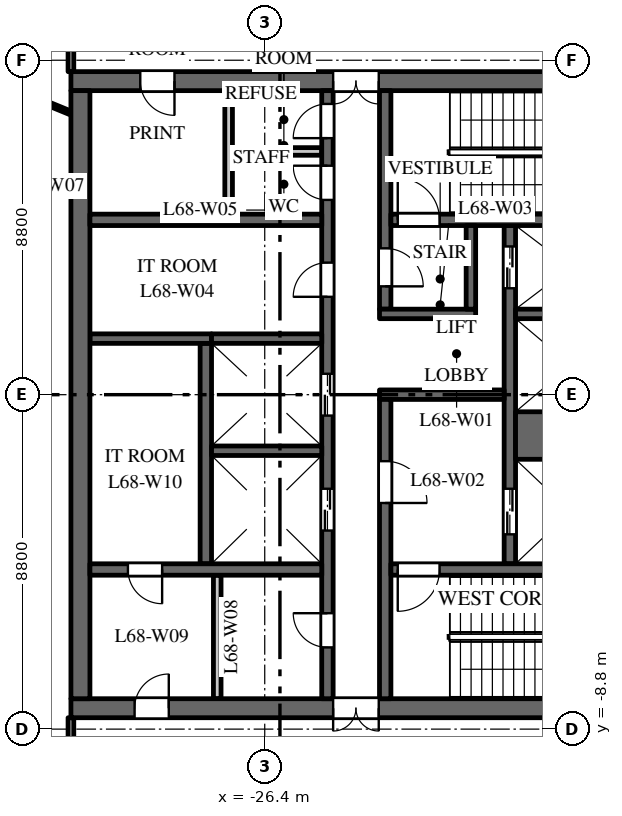
"""IFC4 building model, lengths in metres.
Left out: names, types, materials, properties, quantities, classifications, styles, units other than length and angle.
Written with IfcOpenShell. Run it as: python <this file> out.ifc"""

import sys

from ifc_helpers import new_model, si_unit, direction, frame, frame_2d, origin, place, context, subcontext, project, spatial, rectangle, extrude, element, fill, save


model = new_model("IFC4")
c1 = context("Model", 3, precision=1e-05, world=origin(), true_north=direction((0.0, 1.0)))
c2 = subcontext(c1, "Body", "Model", "MODEL_VIEW")
j1 = project(units=[si_unit("LENGTHUNIT", "METRE"), si_unit("PLANEANGLEUNIT", "RADIAN")], contexts=[c1])
p1 = place(None, origin())
s1 = spatial("IfcSite", under=j1, at=p1, CompositionType="ELEMENT")
p2 = place(p1, origin())
s2 = spatial("IfcBuilding", under=s1, at=p2, CompositionType="ELEMENT")
p3 = place(p2, frame((0.0, 0.0, 315.0)))
s3 = spatial("IfcBuildingStorey", under=s2, at=p3, CompositionType="ELEMENT", Elevation=315.0)
p4 = place(p3, frame((-16.5, 8.25, 0.0), z_axis=(0.0, 0.0, 1.0), x_axis=(-1.0, 0.0, 0.0)))
e1 = element("IfcWall", 1, at=p4, inside=s3, PredefinedType="SHEAR", context=c2, shape_type="SweptSolid", body=[
    extrude(rectangle(XDim=15.0, YDim=0.5, at=frame_2d((7.5, 0.0))), origin(), (0.0, 0.0, 1.0), 3.7),
])
p5 = place(p4, frame((6.9, 0.0, 0.0)))
e2 = element("IfcOpeningElement", 2, at=p5, cuts=e1, PredefinedType="OPENING", context=c2, shape_type="SweptSolid", body=[
    extrude(rectangle(XDim=1.2, YDim=2.1, at=frame_2d((0.6, 1.05))), frame((0.0, 0.26, 0.0), z_axis=(0.0, -1.0, 0.0), x_axis=(1.0, 0.0, 0.0)), (0.0, 0.0, 1.0), 0.52),
])
p6 = place(p4, frame((12.275, 0.0, 0.0)))
e3 = element("IfcOpeningElement", 3, at=p6, cuts=e1, PredefinedType="OPENING", context=c2, shape_type="SweptSolid", body=[
    extrude(rectangle(XDim=0.9, YDim=2.1, at=frame_2d((0.45, 1.05))), frame((0.0, 0.26, 0.0), z_axis=(0.0, -1.0, 0.0), x_axis=(1.0, 0.0, 0.0)), (0.0, 0.0, 1.0), 0.52),
])
p7 = place(p3, frame((-16.5, -8.25, 0.0), z_axis=(0.0, 0.0, 1.0), x_axis=(-1.0, 0.0, 0.0)))
e4 = element("IfcWall", 4, at=p7, inside=s3, PredefinedType="SHEAR", context=c2, shape_type="SweptSolid", body=[
    extrude(rectangle(XDim=15.0, YDim=0.5, at=frame_2d((7.5, 0.0))), origin(), (0.0, 0.0, 1.0), 3.7),
])
p8 = place(p7, frame((6.9, 0.0, 0.0)))
e5 = element("IfcOpeningElement", 5, at=p8, cuts=e4, PredefinedType="OPENING", context=c2, shape_type="SweptSolid", body=[
    extrude(rectangle(XDim=1.2, YDim=2.1, at=frame_2d((0.6, 1.05))), frame((0.0, 0.26, 0.0), z_axis=(0.0, -1.0, 0.0), x_axis=(1.0, 0.0, 0.0)), (0.0, 0.0, 1.0), 0.52),
])
p9 = place(p7, frame((12.425, 0.0, 0.0)))
e6 = element("IfcOpeningElement", 6, at=p9, cuts=e4, PredefinedType="OPENING", context=c2, shape_type="SweptSolid", body=[
    extrude(rectangle(XDim=0.9, YDim=2.1, at=frame_2d((0.45, 1.05))), frame((0.0, 0.26, 0.0), z_axis=(0.0, -1.0, 0.0), x_axis=(1.0, 0.0, 0.0)), (0.0, 0.0, 1.0), 0.52),
])
p10 = place(p3, frame((-27.95, -4.45, 0.0), z_axis=(0.0, 0.0, 1.0), x_axis=(0.0, 1.0, 0.0)))
e7 = element("IfcWall", 7, at=p10, inside=s3, PredefinedType="SHEAR", context=c2, shape_type="SweptSolid", body=[
    extrude(rectangle(XDim=5.8, YDim=0.3, at=frame_2d((2.9, 0.0))), origin(), (0.0, 0.0, 1.0), 3.7),
])
p11 = place(p3, frame((-27.8, 1.475, 0.0), z_axis=(0.0, 0.0, 1.0), x_axis=(-1.0, 0.0, 0.0)))
e8 = element("IfcWall", 8, at=p11, inside=s3, PredefinedType="SHEAR", context=c2, shape_type="SweptSolid", body=[
    extrude(rectangle(XDim=3.2, YDim=0.25, at=frame_2d((1.6, 0.0))), origin(), (0.0, 0.0, 1.0), 3.7),
])
p12 = place(p3, frame((-19.95, -4.45, 0.0), z_axis=(0.0, 0.0, 1.0), x_axis=(0.0, 1.0, 0.0)))
e9 = element("IfcWall", 9, at=p12, inside=s3, PredefinedType="SHEAR", context=c2, shape_type="SweptSolid", body=[
    extrude(rectangle(XDim=8.9, YDim=0.3, at=frame_2d((4.45, 0.0))), origin(), (0.0, 0.0, 1.0), 3.7),
])
p13 = place(p12, frame((0.775, 0.0, 0.0)))
e10 = element("IfcOpeningElement", 10, at=p13, cuts=e9, PredefinedType="OPENING", context=c2, shape_type="SweptSolid", body=[
    extrude(rectangle(XDim=1.2, YDim=2.1, at=frame_2d((0.6, 1.05))), frame((0.0, 0.16, 0.0), z_axis=(0.0, -1.0, 0.0), x_axis=(1.0, 0.0, 0.0)), (0.0, 0.0, 1.0), 0.32),
])
p14 = place(p12, frame((7.25, 0.0, 0.0)))
e11 = element("IfcOpeningElement", 11, at=p14, cuts=e9, PredefinedType="OPENING", context=c2, shape_type="SweptSolid", body=[
    extrude(rectangle(XDim=1.1, YDim=2.1, at=frame_2d((0.55, 1.05))), frame((0.0, 0.16, 0.0), z_axis=(0.0, -1.0, 0.0), x_axis=(1.0, 0.0, 0.0)), (0.0, 0.0, 1.0), 0.32),
])
p15 = place(p3, frame((-24.75, -8.0, 0.0), z_axis=(0.0, 0.0, 1.0), x_axis=(0.0, 1.0, 0.0)))
e12 = element("IfcWall", 12, at=p15, inside=s3, PredefinedType="SHEAR", context=c2, shape_type="SweptSolid", body=[
    extrude(rectangle(XDim=16.0, YDim=0.3, at=frame_2d((8.0, 0.0))), origin(), (0.0, 0.0, 1.0), 3.7),
])
p16 = place(p15, frame((4.425, 0.0, 0.0)))
e13 = element("IfcOpeningElement", 13, at=p16, cuts=e12, PredefinedType="OPENING", context=c2, shape_type="SweptSolid", body=[
    extrude(rectangle(XDim=1.1, YDim=2.1, at=frame_2d((0.55, 1.05))), frame((0.0, 0.16, 0.0), z_axis=(0.0, -1.0, 0.0), x_axis=(1.0, 0.0, 0.0)), (0.0, 0.0, 1.0), 0.32),
])
p17 = place(p15, frame((7.45, 0.0, 0.0)))
e14 = element("IfcOpeningElement", 14, at=p17, cuts=e12, PredefinedType="OPENING", context=c2, shape_type="SweptSolid", body=[
    extrude(rectangle(XDim=1.1, YDim=2.1, at=frame_2d((0.55, 1.05))), frame((0.0, 0.16, 0.0), z_axis=(0.0, -1.0, 0.0), x_axis=(1.0, 0.0, 0.0)), (0.0, 0.0, 1.0), 0.32),
])
p18 = place(p15, frame((10.575, 0.0, 0.0)))
e15 = element("IfcOpeningElement", 15, at=p18, cuts=e12, PredefinedType="OPENING", context=c2, shape_type="SweptSolid", body=[
    extrude(rectangle(XDim=0.9, YDim=2.1, at=frame_2d((0.45, 1.05))), frame((0.0, 0.16, 0.0), z_axis=(0.0, -1.0, 0.0), x_axis=(1.0, 0.0, 0.0)), (0.0, 0.0, 1.0), 0.32),
])
p19 = place(p15, frame((13.125, 0.0, 0.0)))
e16 = element("IfcOpeningElement", 16, at=p19, cuts=e12, PredefinedType="OPENING", context=c2, shape_type="SweptSolid", body=[
    extrude(rectangle(XDim=0.9, YDim=2.1, at=frame_2d((0.45, 1.05))), frame((0.0, 0.16, 0.0), z_axis=(0.0, -1.0, 0.0), x_axis=(1.0, 0.0, 0.0)), (0.0, 0.0, 1.0), 0.32),
])
p20 = place(p15, frame((14.75, 0.0, 0.0)))
e17 = element("IfcOpeningElement", 17, at=p20, cuts=e12, PredefinedType="OPENING", context=c2, shape_type="SweptSolid", body=[
    extrude(rectangle(XDim=0.9, YDim=2.1, at=frame_2d((0.45, 1.05))), frame((0.0, 0.16, 0.0), z_axis=(0.0, -1.0, 0.0), x_axis=(1.0, 0.0, 0.0)), (0.0, 0.0, 1.0), 0.32),
])
p21 = place(p15, frame((1.35, 0.0, 0.0)))
e18 = element("IfcOpeningElement", 18, at=p21, cuts=e12, PredefinedType="OPENING", context=c2, shape_type="SweptSolid", body=[
    extrude(rectangle(XDim=0.9, YDim=2.1, at=frame_2d((0.45, 1.05))), frame((0.0, 0.16, 0.0), z_axis=(0.0, -1.0, 0.0), x_axis=(1.0, 0.0, 0.0)), (0.0, 0.0, 1.0), 0.32),
])
p22 = place(p3, frame((-20.1, 0.0, 0.0), z_axis=(0.0, 0.0, 1.0), x_axis=(-1.0, 0.0, 0.0)))
e19 = element("IfcWall", 19, at=p22, inside=s3, PredefinedType="SHEAR", context=c2, shape_type="SweptSolid", body=[
    extrude(rectangle(XDim=3.28, YDim=0.25, at=frame_2d((1.64, 0.0))), origin(), (0.0, 0.0, 1.0), 3.7),
])
p23 = place(p3, frame((-31.25, -8.0, 0.0), z_axis=(0.0, 0.0, 1.0), x_axis=(0.0, 1.0, 0.0)))
e20 = element("IfcWall", 20, at=p23, inside=s3, PredefinedType="SHEAR", context=c2, shape_type="SweptSolid", body=[
    extrude(rectangle(XDim=16.0, YDim=0.5, at=frame_2d((8.0, 0.0))), origin(), (0.0, 0.0, 1.0), 3.7),
])
p24 = place(p3, frame((-24.9, 4.6, 0.0), z_axis=(0.0, 0.0, 1.0), x_axis=(-1.0, 0.0, 0.0)))
e21 = element("IfcWall", 21, at=p24, inside=s3, PredefinedType="SHEAR", context=c2, shape_type="SweptSolid", body=[
    extrude(rectangle(XDim=6.1, YDim=0.3, at=frame_2d((3.05, 0.0))), origin(), (0.0, 0.0, 1.0), 3.7),
])
for number, where, z_axis, x_axis in (
    (22, (-27.35, 4.75, 0.0), (0.0, 0.0, 1.0), (0.0, 1.0, 0.0)),
    (23, (-27.65, -8.0, 0.0), (0.0, 0.0, 1.0), (0.0, 1.0, 0.0)),
):
    element("IfcWall", number, at=place(p3, frame(where, z_axis=z_axis, x_axis=x_axis)), inside=s3, PredefinedType="PARTITIONING", context=c2, shape_type="SweptSolid", body=[
        extrude(rectangle(XDim=3.25, YDim=0.2, at=frame_2d((1.625, 0.0))), origin(), (0.0, 0.0, 1.0), 3.7),
    ])
p25 = place(p3, frame((-24.9, 6.4, 0.0), z_axis=(0.0, 0.0, 1.0), x_axis=(-1.0, 0.0, 0.0)))
e24 = element("IfcWall", 24, at=p25, inside=s3, PredefinedType="PARTITIONING", context=c2, shape_type="SweptSolid", body=[
    extrude(rectangle(XDim=2.35, YDim=0.2, at=frame_2d((1.175, 0.0))), origin(), (0.0, 0.0, 1.0), 3.7),
])
p26 = place(p3, frame((-24.9, -4.6, 0.0), z_axis=(0.0, 0.0, 1.0), x_axis=(-1.0, 0.0, 0.0)))
e25 = element("IfcWall", 25, at=p26, inside=s3, PredefinedType="SHEAR", context=c2, shape_type="SweptSolid", body=[
    extrude(rectangle(XDim=6.1, YDim=0.3, at=frame_2d((3.05, 0.0))), origin(), (0.0, 0.0, 1.0), 3.7),
])
p27 = place(p26, frame((4.2, 0.0, 0.0)))
e26 = element("IfcOpeningElement", 26, at=p27, cuts=e25, PredefinedType="OPENING", context=c2, shape_type="SweptSolid", body=[
    extrude(rectangle(XDim=0.9, YDim=2.1, at=frame_2d((0.45, 1.05))), frame((0.0, 0.16, 0.0), z_axis=(0.0, -1.0, 0.0), x_axis=(1.0, 0.0, 0.0)), (0.0, 0.0, 1.0), 0.32),
])
p28 = place(p3, frame((-16.9, -1.075, 0.0), z_axis=(0.0, 0.0, 1.0), x_axis=(-1.0, 0.0, 0.0)))
e27 = element("IfcWall", 27, at=p28, inside=s3, PredefinedType="SHEAR", context=c2, shape_type="SweptSolid", body=[
    extrude(rectangle(XDim=2.9, YDim=1.25, at=frame_2d((1.45, 0.0))), origin(), (0.0, 0.0, 1.0), 3.7),
])
for number, where, z_axis, x_axis in (
    (28, (-16.9, 2.125, 0.0), (0.0, 0.0, 1.0), (-1.0, 0.0, 0.0)),
    (29, (-24.9, -1.475, 0.0), (0.0, 0.0, 1.0), (-1.0, 0.0, 0.0)),
    (30, (-24.9, 1.475, 0.0), (0.0, 0.0, 1.0), (-1.0, 0.0, 0.0)),
):
    element("IfcWall", number, at=place(p3, frame(where, z_axis=z_axis, x_axis=x_axis)), inside=s3, PredefinedType="SHEAR", context=c2, shape_type="SweptSolid", body=[
        extrude(rectangle(XDim=2.9, YDim=0.25, at=frame_2d((1.45, 0.0))), origin(), (0.0, 0.0, 1.0), 3.7),
    ])
p29 = place(p3, frame((-23.23, 2.25, 0.0), z_axis=(0.0, 0.0, 1.0), x_axis=(0.0, 1.0, 0.0)))
e31 = element("IfcWall", 31, at=p29, inside=s3, PredefinedType="SHEAR", context=c2, shape_type="SweptSolid", body=[
    extrude(rectangle(XDim=5.75, YDim=0.3, at=frame_2d((2.875, 0.0))), origin(), (0.0, 0.0, 1.0), 3.7),
])
p30 = place(p29, frame((0.6, 0.0, 0.0)))
e32 = element("IfcOpeningElement", 32, at=p30, cuts=e31, PredefinedType="OPENING", context=c2, shape_type="SweptSolid", body=[
    extrude(rectangle(XDim=1.0, YDim=2.1, at=frame_2d((0.5, 1.05))), frame((0.0, 0.16, 0.0), z_axis=(0.0, -1.0, 0.0), x_axis=(1.0, 0.0, 0.0)), (0.0, 0.0, 1.0), 0.32),
])
p31 = place(p3, frame((-23.23, -8.0, 0.0), z_axis=(0.0, 0.0, 1.0), x_axis=(0.0, 1.0, 0.0)))
e33 = element("IfcWall", 33, at=p31, inside=s3, PredefinedType="SHEAR", context=c2, shape_type="SweptSolid", body=[
    extrude(rectangle(XDim=7.875, YDim=0.3, at=frame_2d((3.938, 0.0))), origin(), (0.0, 0.0, 1.0), 3.7),
])
p32 = place(p31, frame((5.15, 0.0, 0.0)))
e34 = element("IfcOpeningElement", 34, at=p32, cuts=e33, PredefinedType="OPENING", context=c2, shape_type="SweptSolid", body=[
    extrude(rectangle(XDim=1.1, YDim=2.1, at=frame_2d((0.55, 1.05))), frame((0.0, 0.16, 0.0), z_axis=(0.0, -1.0, 0.0), x_axis=(1.0, 0.0, 0.0)), (0.0, 0.0, 1.0), 0.32),
])
p33 = place(p3, frame((-16.9, 4.6, 0.0), z_axis=(0.0, 0.0, 1.0), x_axis=(-1.0, 0.0, 0.0)))
e35 = element("IfcWall", 35, at=p33, inside=s3, PredefinedType="SHEAR", context=c2, shape_type="SweptSolid", body=[
    extrude(rectangle(XDim=6.18, YDim=0.3, at=frame_2d((3.09, 0.0))), origin(), (0.0, 0.0, 1.0), 3.7),
])
p34 = place(p33, frame((4.9, 0.0, 0.0)))
e36 = element("IfcOpeningElement", 36, at=p34, cuts=e35, PredefinedType="OPENING", context=c2, shape_type="SweptSolid", body=[
    extrude(rectangle(XDim=1.1, YDim=2.1, at=frame_2d((0.55, 1.05))), frame((0.0, 0.16, 0.0), z_axis=(0.0, -1.0, 0.0), x_axis=(1.0, 0.0, 0.0)), (0.0, 0.0, 1.0), 0.32),
])
p35 = place(p3, frame((-16.9, -4.6, 0.0), z_axis=(0.0, 0.0, 1.0), x_axis=(-1.0, 0.0, 0.0)))
e37 = element("IfcWall", 37, at=p35, inside=s3, PredefinedType="SHEAR", context=c2, shape_type="SweptSolid", body=[
    extrude(rectangle(XDim=6.18, YDim=0.3, at=frame_2d((3.09, 0.0))), origin(), (0.0, 0.0, 1.0), 3.7),
])
p36 = place(p35, frame((4.9, 0.0, 0.0)))
e38 = element("IfcOpeningElement", 38, at=p36, cuts=e37, PredefinedType="OPENING", context=c2, shape_type="SweptSolid", body=[
    extrude(rectangle(XDim=1.1, YDim=2.1, at=frame_2d((0.55, 1.05))), frame((0.0, 0.16, 0.0), z_axis=(0.0, -1.0, 0.0), x_axis=(1.0, 0.0, 0.0)), (0.0, 0.0, 1.0), 0.32),
])
p37 = place(p3, frame((-20.85, 2.125, 0.0), z_axis=(0.0, 0.0, 1.0), x_axis=(-1.0, 0.0, 0.0)))
e39 = element("IfcWall", 39, at=p37, inside=s3, PredefinedType="SHEAR", context=c2, shape_type="SweptSolid", body=[
    extrude(rectangle(XDim=2.53, YDim=0.25, at=frame_2d((1.265, 0.0))), origin(), (0.0, 0.0, 1.0), 3.7),
])
p38 = place(p3, frame((-20.975, 2.25, 0.0), z_axis=(0.0, 0.0, 1.0), x_axis=(0.0, 1.0, 0.0)))
e40 = element("IfcWall", 40, at=p38, inside=s3, PredefinedType="SHEAR", context=c2, shape_type="SweptSolid", body=[
    extrude(rectangle(XDim=2.2, YDim=0.25, at=frame_2d((1.1, 0.0))), origin(), (0.0, 0.0, 1.0), 3.7),
])
p39 = place(p3, frame((-34.234, 8.53, 0.0), z_axis=(0.0, 0.0, 1.0), x_axis=(0.925344112436, -0.379128307542, 0.0)))
e41 = element("IfcWall", 41, at=p39, inside=s3, PredefinedType="PARTITIONING", context=c2, shape_type="SweptSolid", body=[
    extrude(rectangle(XDim=2.954, YDim=0.1, at=frame_2d((1.477, 0.0))), origin(), (0.0, 0.0, 1.0), 3.0),
])
for number, where, z_axis, x_axis in (
    (42, (-31.5, -11.5, 0.0), (0.0, 0.0, 1.0), (0.0, 1.0, 0.0)),
    (43, (-31.5, 8.5, 0.0), (0.0, 0.0, 1.0), (0.0, 1.0, 0.0)),
):
    element("IfcWall", number, at=place(p3, frame(where, z_axis=z_axis, x_axis=x_axis)), inside=s3, PredefinedType="PARTITIONING", context=c2, shape_type="SweptSolid", body=[
        extrude(rectangle(XDim=3.0, YDim=0.15, at=frame_2d((1.5, 0.0))), origin(), (0.0, 0.0, 1.0), 3.0),
    ])
p40 = place(p13, origin())
e44 = element("IfcDoor", 44, at=p40, inside=s3, OperationType="DOUBLE_DOOR_SLIDING", PredefinedType="DOOR", context=c2, shape_type="SweptSolid", body=[
    extrude(rectangle(XDim=1.2, YDim=2.1, at=frame_2d((0.6, 1.05))), frame((0.0, 0.025, 0.0), z_axis=(0.0, -1.0, 0.0), x_axis=(1.0, 0.0, 0.0)), (0.0, 0.0, 1.0), 0.05),
])
fill(e10, e44)
p41 = place(p14, origin())
e45 = element("IfcDoor", 45, at=p41, inside=s3, OperationType="DOUBLE_DOOR_SLIDING", PredefinedType="DOOR", context=c2, shape_type="SweptSolid", body=[
    extrude(rectangle(XDim=1.1, YDim=2.1, at=frame_2d((0.55, 1.05))), frame((0.0, 0.025, 0.0), z_axis=(0.0, -1.0, 0.0), x_axis=(1.0, 0.0, 0.0)), (0.0, 0.0, 1.0), 0.05),
])
fill(e11, e45)
p42 = place(p16, origin())
e46 = element("IfcDoor", 46, at=p42, inside=s3, OperationType="DOUBLE_DOOR_SLIDING", PredefinedType="DOOR", context=c2, shape_type="SweptSolid", body=[
    extrude(rectangle(XDim=1.1, YDim=2.1, at=frame_2d((0.55, 1.05))), frame((0.0, 0.025, 0.0), z_axis=(0.0, -1.0, 0.0), x_axis=(1.0, 0.0, 0.0)), (0.0, 0.0, 1.0), 0.05),
])
fill(e13, e46)
p43 = place(p17, origin())
e47 = element("IfcDoor", 47, at=p43, inside=s3, OperationType="DOUBLE_DOOR_SLIDING", PredefinedType="DOOR", context=c2, shape_type="SweptSolid", body=[
    extrude(rectangle(XDim=1.1, YDim=2.1, at=frame_2d((0.55, 1.05))), frame((0.0, 0.025, 0.0), z_axis=(0.0, -1.0, 0.0), x_axis=(1.0, 0.0, 0.0)), (0.0, 0.0, 1.0), 0.05),
])
fill(e14, e47)
p44 = place(p34, origin())
e48 = element("IfcDoor", 48, at=p44, inside=s3, OperationType="SINGLE_SWING_RIGHT", PredefinedType="DOOR", context=c2, shape_type="SweptSolid", body=[
    extrude(rectangle(XDim=1.1, YDim=2.1, at=frame_2d((0.55, 1.05))), frame((0.0, 0.025, 0.0), z_axis=(0.0, -1.0, 0.0), x_axis=(1.0, 0.0, 0.0)), (0.0, 0.0, 1.0), 0.05),
])
fill(e36, e48)
p45 = place(p36, origin())
e49 = element("IfcDoor", 49, at=p45, inside=s3, OperationType="SINGLE_SWING_LEFT", PredefinedType="DOOR", context=c2, shape_type="SweptSolid", body=[
    extrude(rectangle(XDim=1.1, YDim=2.1, at=frame_2d((0.55, 1.05))), frame((0.0, 0.025, 0.0), z_axis=(0.0, -1.0, 0.0), x_axis=(1.0, 0.0, 0.0)), (0.0, 0.0, 1.0), 0.05),
])
fill(e38, e49)
p46 = place(p32, origin())
e50 = element("IfcDoor", 50, at=p46, inside=s3, OperationType="SINGLE_SWING_LEFT", PredefinedType="DOOR", context=c2, shape_type="SweptSolid", body=[
    extrude(rectangle(XDim=1.1, YDim=2.1, at=frame_2d((0.55, 1.05))), frame((0.0, 0.025, 0.0), z_axis=(0.0, -1.0, 0.0), x_axis=(1.0, 0.0, 0.0)), (0.0, 0.0, 1.0), 0.05),
])
fill(e34, e50)
p47 = place(p30, origin())
e51 = element("IfcDoor", 51, at=p47, inside=s3, OperationType="SINGLE_SWING_LEFT", PredefinedType="DOOR", context=c2, shape_type="SweptSolid", body=[
    extrude(rectangle(XDim=1.0, YDim=2.1, at=frame_2d((0.5, 1.05))), frame((0.0, 0.025, 0.0), z_axis=(0.0, -1.0, 0.0), x_axis=(1.0, 0.0, 0.0)), (0.0, 0.0, 1.0), 0.05),
])
fill(e32, e51)
p48 = place(p5, origin())
e52 = element("IfcDoor", 52, at=p48, inside=s3, OperationType="DOUBLE_DOOR_DOUBLE_SWING", PredefinedType="DOOR", context=c2, shape_type="SweptSolid", body=[
    extrude(rectangle(XDim=1.2, YDim=2.1, at=frame_2d((0.6, 1.05))), frame((0.0, 0.025, 0.0), z_axis=(0.0, -1.0, 0.0), x_axis=(1.0, 0.0, 0.0)), (0.0, 0.0, 1.0), 0.05),
])
fill(e2, e52)
p49 = place(p8, origin())
e53 = element("IfcDoor", 53, at=p49, inside=s3, OperationType="DOUBLE_DOOR_DOUBLE_SWING", PredefinedType="DOOR", context=c2, shape_type="SweptSolid", body=[
    extrude(rectangle(XDim=1.2, YDim=2.1, at=frame_2d((0.6, 1.05))), frame((0.0, 0.025, 0.0), z_axis=(0.0, -1.0, 0.0), x_axis=(1.0, 0.0, 0.0)), (0.0, 0.0, 1.0), 0.05),
])
fill(e5, e53)
p50 = place(p18, origin())
e54 = element("IfcDoor", 54, at=p50, inside=s3, OperationType="SINGLE_SWING_RIGHT", PredefinedType="DOOR", context=c2, shape_type="SweptSolid", body=[
    extrude(rectangle(XDim=0.9, YDim=2.1, at=frame_2d((0.45, 1.05))), frame((0.0, 0.025, 0.0), z_axis=(0.0, -1.0, 0.0), x_axis=(1.0, 0.0, 0.0)), (0.0, 0.0, 1.0), 0.05),
])
fill(e15, e54)
p51 = place(p19, origin())
e55 = element("IfcDoor", 55, at=p51, inside=s3, OperationType="SINGLE_SWING_LEFT", PredefinedType="DOOR", context=c2, shape_type="SweptSolid", body=[
    extrude(rectangle(XDim=0.9, YDim=2.1, at=frame_2d((0.45, 1.05))), frame((0.0, 0.025, 0.0), z_axis=(0.0, -1.0, 0.0), x_axis=(1.0, 0.0, 0.0)), (0.0, 0.0, 1.0), 0.05),
])
fill(e16, e55)
p52 = place(p20, origin())
e56 = element("IfcDoor", 56, at=p52, inside=s3, OperationType="SINGLE_SWING_RIGHT", PredefinedType="DOOR", context=c2, shape_type="SweptSolid", body=[
    extrude(rectangle(XDim=0.9, YDim=2.1, at=frame_2d((0.45, 1.05))), frame((0.0, 0.025, 0.0), z_axis=(0.0, -1.0, 0.0), x_axis=(1.0, 0.0, 0.0)), (0.0, 0.0, 1.0), 0.05),
])
fill(e17, e56)
p53 = place(p6, origin())
e57 = element("IfcDoor", 57, at=p53, inside=s3, OperationType="SINGLE_SWING_RIGHT", PredefinedType="DOOR", context=c2, shape_type="SweptSolid", body=[
    extrude(rectangle(XDim=0.9, YDim=2.1, at=frame_2d((0.45, 1.05))), frame((0.0, 0.025, 0.0), z_axis=(0.0, -1.0, 0.0), x_axis=(1.0, 0.0, 0.0)), (0.0, 0.0, 1.0), 0.05),
])
fill(e3, e57)
p54 = place(p21, origin())
e58 = element("IfcDoor", 58, at=p54, inside=s3, OperationType="SINGLE_SWING_LEFT", PredefinedType="DOOR", context=c2, shape_type="SweptSolid", body=[
    extrude(rectangle(XDim=0.9, YDim=2.1, at=frame_2d((0.45, 1.05))), frame((0.0, 0.025, 0.0), z_axis=(0.0, -1.0, 0.0), x_axis=(1.0, 0.0, 0.0)), (0.0, 0.0, 1.0), 0.05),
])
fill(e18, e58)
p55 = place(p9, origin())
e59 = element("IfcDoor", 59, at=p55, inside=s3, OperationType="SINGLE_SWING_LEFT", PredefinedType="DOOR", context=c2, shape_type="SweptSolid", body=[
    extrude(rectangle(XDim=0.9, YDim=2.1, at=frame_2d((0.45, 1.05))), frame((0.0, 0.025, 0.0), z_axis=(0.0, -1.0, 0.0), x_axis=(1.0, 0.0, 0.0)), (0.0, 0.0, 1.0), 0.05),
])
fill(e6, e59)
p56 = place(p27, origin())
e60 = element("IfcDoor", 60, at=p56, inside=s3, OperationType="SINGLE_SWING_RIGHT", PredefinedType="DOOR", context=c2, shape_type="SweptSolid", body=[
    extrude(rectangle(XDim=0.9, YDim=2.1, at=frame_2d((0.45, 1.05))), frame((0.0, 0.025, 0.0), z_axis=(0.0, -1.0, 0.0), x_axis=(1.0, 0.0, 0.0)), (0.0, 0.0, 1.0), 0.05),
])
fill(e26, e60)
save(model, sys.argv[1])
